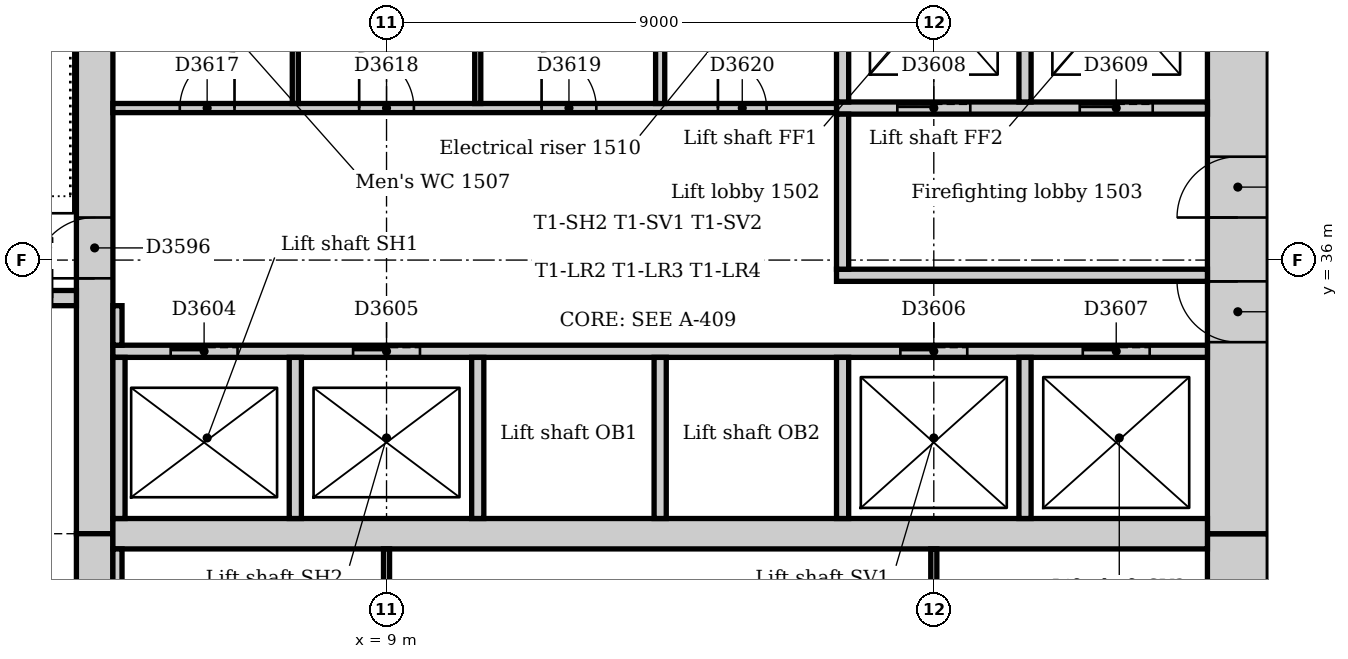
"""IFC4 building model, lengths in metres.
Left out: names, types, materials, properties, quantities, classifications, styles, units other than length and angle.
Written with IfcOpenShell. Run it as: python <this file> out.ifc"""

import sys

from ifc_helpers import new_model, si_unit, direction, frame, frame_2d, origin, place, context, subcontext, project, spatial, rectangle, extrude, element, fill, save


model = new_model("IFC4")
c1 = context("Model", 3, precision=1e-05, world=origin(), true_north=direction((0.0, 1.0)))
c2 = subcontext(c1, "Body", "Model", "MODEL_VIEW")
j1 = project(units=[si_unit("LENGTHUNIT", "METRE"), si_unit("PLANEANGLEUNIT", "RADIAN")], contexts=[c1])
p1 = place(None, origin())
s1 = spatial("IfcSite", under=j1, at=p1, CompositionType="ELEMENT")
p2 = place(p1, origin())
s2 = spatial("IfcBuilding", under=s1, at=p2, CompositionType="ELEMENT")
p3 = place(p2, frame((0.0, 0.0, 67.0)))
s3 = spatial("IfcBuildingStorey", under=s2, at=p3, CompositionType="ELEMENT", Elevation=67.0)
p4 = place(p3, frame((23.0, 21.0, 0.0), z_axis=(0.0, 0.0, 1.0), x_axis=(0.0, 1.0, 0.0)))
e1 = element("IfcWall", 1, at=p4, inside=s3, PredefinedType="SOLIDWALL", context=c2, shape_type="SweptSolid", body=[
    extrude(rectangle(XDim=10.5, YDim=1.0, at=frame_2d((5.25, 0.0))), origin(), (0.0, 0.0, 1.0), 4.0),
])
p5 = place(p4, frame((4.35, 0.0, 0.0)))
e2 = element("IfcOpeningElement", 2, at=p5, cuts=e1, PredefinedType="OPENING", context=c2, shape_type="SweptSolid", body=[
    extrude(rectangle(XDim=1.8, YDim=2.1, at=frame_2d((0.9, 1.05))), frame((0.0, 0.51, 0.0), z_axis=(0.0, -1.0, 0.0), x_axis=(1.0, 0.0, 0.0)), (0.0, 0.0, 1.0), 1.02),
])
p6 = place(p3, frame((23.0, 31.5, 0.0), z_axis=(0.0, 0.0, 1.0), x_axis=(0.0, 1.0, 0.0)))
e3 = element("IfcWall", 3, at=p6, inside=s3, PredefinedType="SOLIDWALL", context=c2, shape_type="SweptSolid", body=[
    extrude(rectangle(XDim=10.5, YDim=1.0, at=frame_2d((5.25, 0.0))), origin(), (0.0, 0.0, 1.0), 4.0),
])
p7 = place(p6, frame((3.15, 0.0, 0.0)))
e4 = element("IfcOpeningElement", 4, at=p7, cuts=e3, PredefinedType="OPENING", context=c2, shape_type="SweptSolid", body=[
    extrude(rectangle(XDim=1.0, YDim=2.1, at=frame_2d((0.5, 1.05))), frame((0.0, 0.51, 0.0), z_axis=(0.0, -1.0, 0.0), x_axis=(1.0, 0.0, 0.0)), (0.0, 0.0, 1.0), 1.02),
])
p8 = place(p6, frame((5.2, 0.0, 0.0)))
e5 = element("IfcOpeningElement", 5, at=p8, cuts=e3, PredefinedType="OPENING", context=c2, shape_type="SweptSolid", body=[
    extrude(rectangle(XDim=1.0, YDim=2.1, at=frame_2d((0.5, 1.05))), frame((0.0, 0.51, 0.0), z_axis=(0.0, -1.0, 0.0), x_axis=(1.0, 0.0, 0.0)), (0.0, 0.0, 1.0), 1.02),
])
p9 = place(p3, frame((4.2, 42.0, 0.0), z_axis=(0.0, 0.0, 1.0), x_axis=(0.0, -1.0, 0.0)))
e6 = element("IfcWall", 6, at=p9, inside=s3, PredefinedType="SOLIDWALL", context=c2, shape_type="SweptSolid", body=[
    extrude(rectangle(XDim=10.5, YDim=0.6, at=frame_2d((5.25, 0.0))), origin(), (0.0, 0.0, 1.0), 4.0),
])
p10 = place(p9, frame((5.3, 0.0, 0.0)))
e7 = element("IfcOpeningElement", 7, at=p10, cuts=e6, PredefinedType="OPENING", context=c2, shape_type="SweptSolid", body=[
    extrude(rectangle(XDim=1.0, YDim=2.1, at=frame_2d((0.5, 1.05))), frame((0.0, 0.31, 0.0), z_axis=(0.0, -1.0, 0.0), x_axis=(1.0, 0.0, 0.0)), (0.0, 0.0, 1.0), 0.62),
])
p11 = place(p3, frame((4.2, 31.5, 0.0), z_axis=(0.0, 0.0, 1.0), x_axis=(0.0, -1.0, 0.0)))
e8 = element("IfcWall", 8, at=p11, inside=s3, PredefinedType="SOLIDWALL", context=c2, shape_type="SweptSolid", body=[
    extrude(rectangle(XDim=10.5, YDim=0.6, at=frame_2d((5.25, 0.0))), origin(), (0.0, 0.0, 1.0), 4.0),
])
p12 = place(p11, frame((4.25, 0.0, 0.0)))
e9 = element("IfcOpeningElement", 9, at=p12, cuts=e8, PredefinedType="OPENING", context=c2, shape_type="SweptSolid", body=[
    extrude(rectangle(XDim=1.0, YDim=2.1, at=frame_2d((0.5, 1.05))), frame((0.0, 0.31, 0.0), z_axis=(0.0, -1.0, 0.0), x_axis=(1.0, 0.0, 0.0)), (0.0, 0.0, 1.0), 0.62),
])
p13 = place(p3, frame((4.5, 31.5, 0.0), z_axis=(0.0, 0.0, 1.0), x_axis=(1.0, 0.0, 0.0)))
e10 = element("IfcWall", 10, at=p13, inside=s3, PredefinedType="SOLIDWALL", context=c2, shape_type="SweptSolid", body=[
    extrude(rectangle(XDim=18.0, YDim=0.5, at=frame_2d((9.0, 0.0))), origin(), (0.0, 0.0, 1.0), 4.0),
])
p14 = place(p3, frame((0.36, 35.375, 0.0), z_axis=(0.0, 0.0, 1.0), x_axis=(1.0, 0.0, 0.0)))
e11 = element("IfcWall", 11, at=p14, inside=s3, PredefinedType="SOLIDWALL", context=c2, shape_type="SweptSolid", body=[
    extrude(rectangle(XDim=3.54, YDim=0.25, at=frame_2d((1.77, 0.0))), origin(), (0.0, 0.0, 1.0), 4.0),
])
p15 = place(p14, frame((2.14, 0.0, 0.0)))
e12 = element("IfcOpeningElement", 12, at=p15, cuts=e11, PredefinedType="OPENING", context=c2, shape_type="SweptSolid", body=[
    extrude(rectangle(XDim=1.0, YDim=2.1, at=frame_2d((0.5, 1.05))), frame((0.0, 0.135, 0.0), z_axis=(0.0, -1.0, 0.0), x_axis=(1.0, 0.0, 0.0)), (0.0, 0.0, 1.0), 0.27),
])
p16 = place(p3, frame((16.4, 35.75, 0.0), z_axis=(0.0, 0.0, 1.0), x_axis=(1.0, 0.0, 0.0)))
e13 = element("IfcWall", 13, at=p16, inside=s3, PredefinedType="PARTITIONING", context=c2, shape_type="SweptSolid", body=[
    extrude(rectangle(XDim=6.1, YDim=0.2, at=frame_2d((3.05, 0.0))), origin(), (0.0, 0.0, 1.0), 3.85),
])
p17 = place(p3, frame((16.4, 38.5, 0.0), z_axis=(0.0, 0.0, 1.0), x_axis=(1.0, 0.0, 0.0)))
e14 = element("IfcWall", 14, at=p17, inside=s3, PredefinedType="PARTITIONING", context=c2, shape_type="SweptSolid", body=[
    extrude(rectangle(XDim=6.1, YDim=0.2, at=frame_2d((3.05, 0.0))), origin(), (0.0, 0.0, 1.0), 3.85),
])
p18 = place(p17, frame((1.0, 0.0, 0.0)))
e15 = element("IfcOpeningElement", 15, at=p18, cuts=e14, PredefinedType="OPENING", context=c2, shape_type="SweptSolid", body=[
    extrude(rectangle(XDim=1.2, YDim=2.1, at=frame_2d((0.6, 1.05))), frame((0.0, 0.11, 0.0), z_axis=(0.0, -1.0, 0.0), x_axis=(1.0, 0.0, 0.0)), (0.0, 0.0, 1.0), 0.22),
])
p19 = place(p17, frame((4.0, 0.0, 0.0)))
e16 = element("IfcOpeningElement", 16, at=p19, cuts=e14, PredefinedType="OPENING", context=c2, shape_type="SweptSolid", body=[
    extrude(rectangle(XDim=1.2, YDim=2.1, at=frame_2d((0.6, 1.05))), frame((0.0, 0.11, 0.0), z_axis=(0.0, -1.0, 0.0), x_axis=(1.0, 0.0, 0.0)), (0.0, 0.0, 1.0), 0.22),
])
p20 = place(p3, frame((16.5, 35.85, 0.0), z_axis=(0.0, 0.0, 1.0), x_axis=(0.0, 1.0, 0.0)))
e17 = element("IfcWall", 17, at=p20, inside=s3, PredefinedType="PARTITIONING", context=c2, shape_type="SweptSolid", body=[
    extrude(rectangle(XDim=2.55, YDim=0.2, at=frame_2d((1.275, 0.0))), origin(), (0.0, 0.0, 1.0), 3.85),
])
p21 = place(p3, frame((4.5, 34.5, 0.0), z_axis=(0.0, 0.0, 1.0), x_axis=(1.0, 0.0, 0.0)))
e18 = element("IfcWall", 18, at=p21, inside=s3, PredefinedType="PARTITIONING", context=c2, shape_type="SweptSolid", body=[
    extrude(rectangle(XDim=18.0, YDim=0.2, at=frame_2d((9.0, 0.0))), origin(), (0.0, 0.0, 1.0), 3.85),
])
p22 = place(p21, frame((0.95, 0.0, 0.0)))
e19 = element("IfcOpeningElement", 19, at=p22, cuts=e18, PredefinedType="OPENING", context=c2, shape_type="SweptSolid", body=[
    extrude(rectangle(XDim=1.1, YDim=2.1, at=frame_2d((0.55, 1.05))), frame((0.0, 0.11, 0.0), z_axis=(0.0, -1.0, 0.0), x_axis=(1.0, 0.0, 0.0)), (0.0, 0.0, 1.0), 0.22),
])
p23 = place(p21, frame((3.95, 0.0, 0.0)))
e20 = element("IfcOpeningElement", 20, at=p23, cuts=e18, PredefinedType="OPENING", context=c2, shape_type="SweptSolid", body=[
    extrude(rectangle(XDim=1.1, YDim=2.1, at=frame_2d((0.55, 1.05))), frame((0.0, 0.11, 0.0), z_axis=(0.0, -1.0, 0.0), x_axis=(1.0, 0.0, 0.0)), (0.0, 0.0, 1.0), 0.22),
])
p24 = place(p21, frame((12.95, 0.0, 0.0)))
e21 = element("IfcOpeningElement", 21, at=p24, cuts=e18, PredefinedType="OPENING", context=c2, shape_type="SweptSolid", body=[
    extrude(rectangle(XDim=1.1, YDim=2.1, at=frame_2d((0.55, 1.05))), frame((0.0, 0.11, 0.0), z_axis=(0.0, -1.0, 0.0), x_axis=(1.0, 0.0, 0.0)), (0.0, 0.0, 1.0), 0.22),
])
p25 = place(p21, frame((15.95, 0.0, 0.0)))
e22 = element("IfcOpeningElement", 22, at=p25, cuts=e18, PredefinedType="OPENING", context=c2, shape_type="SweptSolid", body=[
    extrude(rectangle(XDim=1.1, YDim=2.1, at=frame_2d((0.55, 1.05))), frame((0.0, 0.11, 0.0), z_axis=(0.0, -1.0, 0.0), x_axis=(1.0, 0.0, 0.0)), (0.0, 0.0, 1.0), 0.22),
])
for number, where, z_axis, x_axis in (
    (23, (16.5, 38.6, 0.0), (0.0, 0.0, 1.0), (0.0, 1.0, 0.0)),
    (24, (19.5, 38.6, 0.0), (0.0, 0.0, 1.0), (0.0, 1.0, 0.0)),
):
    element("IfcWall", number, at=place(p3, frame(where, z_axis=z_axis, x_axis=x_axis)), inside=s3, PredefinedType="PARTITIONING", context=c2, shape_type="SweptSolid", body=[
        extrude(rectangle(XDim=3.4, YDim=0.2, at=frame_2d((1.7, 0.0))), origin(), (0.0, 0.0, 1.0), 3.85),
    ])
for number, where, z_axis, x_axis in (
    (25, (4.6, 31.75, 0.0), (0.0, 0.0, 1.0), (0.0, 1.0, 0.0)),
    (26, (7.5, 31.75, 0.0), (0.0, 0.0, 1.0), (0.0, 1.0, 0.0)),
    (27, (10.5, 31.75, 0.0), (0.0, 0.0, 1.0), (0.0, 1.0, 0.0)),
    (28, (13.5, 31.75, 0.0), (0.0, 0.0, 1.0), (0.0, 1.0, 0.0)),
    (29, (16.5, 31.75, 0.0), (0.0, 0.0, 1.0), (0.0, 1.0, 0.0)),
    (30, (19.5, 31.75, 0.0), (0.0, 0.0, 1.0), (0.0, 1.0, 0.0)),
):
    element("IfcWall", number, at=place(p3, frame(where, z_axis=z_axis, x_axis=x_axis)), inside=s3, PredefinedType="PARTITIONING", context=c2, shape_type="SweptSolid", body=[
        extrude(rectangle(XDim=2.65, YDim=0.2, at=frame_2d((1.325, 0.0))), origin(), (0.0, 0.0, 1.0), 3.85),
    ])
p26 = place(p3, frame((4.5, 38.5, 0.0), z_axis=(0.0, 0.0, 1.0), x_axis=(1.0, 0.0, 0.0)))
e31 = element("IfcWall", 31, at=p26, inside=s3, PredefinedType="PARTITIONING", context=c2, shape_type="SweptSolid", body=[
    extrude(rectangle(XDim=11.9, YDim=0.15, at=frame_2d((5.95, 0.0))), origin(), (0.0, 0.0, 1.0), 3.85),
])
p27 = place(p26, frame((1.1, 0.0, 0.0)))
e32 = element("IfcOpeningElement", 32, at=p27, cuts=e31, PredefinedType="OPENING", context=c2, shape_type="SweptSolid", body=[
    extrude(rectangle(XDim=0.9, YDim=2.1, at=frame_2d((0.45, 1.05))), frame((0.0, 0.085, 0.0), z_axis=(0.0, -1.0, 0.0), x_axis=(1.0, 0.0, 0.0)), (0.0, 0.0, 1.0), 0.17),
])
p28 = place(p26, frame((4.05, 0.0, 0.0)))
e33 = element("IfcOpeningElement", 33, at=p28, cuts=e31, PredefinedType="OPENING", context=c2, shape_type="SweptSolid", body=[
    extrude(rectangle(XDim=0.9, YDim=2.1, at=frame_2d((0.45, 1.05))), frame((0.0, 0.085, 0.0), z_axis=(0.0, -1.0, 0.0), x_axis=(1.0, 0.0, 0.0)), (0.0, 0.0, 1.0), 0.17),
])
p29 = place(p26, frame((7.05, 0.0, 0.0)))
e34 = element("IfcOpeningElement", 34, at=p29, cuts=e31, PredefinedType="OPENING", context=c2, shape_type="SweptSolid", body=[
    extrude(rectangle(XDim=0.9, YDim=2.1, at=frame_2d((0.45, 1.05))), frame((0.0, 0.085, 0.0), z_axis=(0.0, -1.0, 0.0), x_axis=(1.0, 0.0, 0.0)), (0.0, 0.0, 1.0), 0.17),
])
p30 = place(p26, frame((9.95, 0.0, 0.0)))
e35 = element("IfcOpeningElement", 35, at=p30, cuts=e31, PredefinedType="OPENING", context=c2, shape_type="SweptSolid", body=[
    extrude(rectangle(XDim=0.8, YDim=2.1, at=frame_2d((0.4, 1.05))), frame((0.0, 0.085, 0.0), z_axis=(0.0, -1.0, 0.0), x_axis=(1.0, 0.0, 0.0)), (0.0, 0.0, 1.0), 0.17),
])
p31 = place(p3, frame((4.575, 28.575, 0.0), z_axis=(0.0, 0.0, 1.0), x_axis=(0.0, 1.0, 0.0)))
e36 = element("IfcWall", 36, at=p31, inside=s3, PredefinedType="PARTITIONING", context=c2, shape_type="SweptSolid", body=[
    extrude(rectangle(XDim=2.675, YDim=0.15, at=frame_2d((1.337, 0.0))), origin(), (0.0, 0.0, 1.0), 3.85),
])
p32 = place(p3, frame((4.575, 34.6, 0.0), z_axis=(0.0, 0.0, 1.0), x_axis=(0.0, 1.0, 0.0)))
e37 = element("IfcWall", 37, at=p32, inside=s3, PredefinedType="PARTITIONING", context=c2, shape_type="SweptSolid", body=[
    extrude(rectangle(XDim=0.65, YDim=0.15, at=frame_2d((0.325, 0.0))), origin(), (0.0, 0.0, 1.0), 3.85),
])
p33 = place(p3, frame((13.5, 38.575, 0.0), z_axis=(0.0, 0.0, 1.0), x_axis=(0.0, 1.0, 0.0)))
e38 = element("IfcWall", 38, at=p33, inside=s3, PredefinedType="PARTITIONING", context=c2, shape_type="SweptSolid", body=[
    extrude(rectangle(XDim=3.425, YDim=0.15, at=frame_2d((1.712, 0.0))), origin(), (0.0, 0.0, 1.0), 3.85),
])
for number, where, z_axis, x_axis in (
    (39, (7.5, 38.575, 0.0), (0.0, 0.0, 1.0), (0.0, 1.0, 0.0)),
    (40, (10.5, 38.575, 0.0), (0.0, 0.0, 1.0), (0.0, 1.0, 0.0)),
):
    element("IfcWall", number, at=place(p3, frame(where, z_axis=z_axis, x_axis=x_axis)), inside=s3, PredefinedType="PARTITIONING", context=c2, shape_type="SweptSolid", body=[
        extrude(rectangle(XDim=3.425, YDim=0.1, at=frame_2d((1.712, 0.0))), origin(), (0.0, 0.0, 1.0), 3.85),
    ])
for number, where, z_axis, x_axis in (
    (41, (9.0, 28.575, 0.0), (0.0, 0.0, 1.0), (0.0, 1.0, 0.0)),
    (42, (18.0, 28.575, 0.0), (0.0, 0.0, 1.0), (0.0, 1.0, 0.0)),
):
    element("IfcWall", number, at=place(p3, frame(where, z_axis=z_axis, x_axis=x_axis)), inside=s3, PredefinedType="PARTITIONING", context=c2, shape_type="SweptSolid", body=[
        extrude(rectangle(XDim=2.675, YDim=0.1, at=frame_2d((1.337, 0.0))), origin(), (0.0, 0.0, 1.0), 3.85),
    ])
p34 = place(p10, frame((1.0, 0.0, 0.0), z_axis=(0.0, 0.0, 1.0), x_axis=(-1.0, 0.0, 0.0)))
e43 = element("IfcDoor", 43, at=p34, inside=s3, OperationType="SINGLE_SWING_LEFT", PredefinedType="DOOR", context=c2, shape_type="SweptSolid", body=[
    extrude(rectangle(XDim=1.0, YDim=2.1, at=frame_2d((0.5, 1.05))), frame((0.0, 0.025, 0.0), z_axis=(0.0, -1.0, 0.0), x_axis=(1.0, 0.0, 0.0)), (0.0, 0.0, 1.0), 0.05),
])
fill(e7, e43)
p35 = place(p22, origin())
e44 = element("IfcDoor", 44, at=p35, inside=s3, OperationType="SLIDING_TO_LEFT", PredefinedType="DOOR", context=c2, shape_type="SweptSolid", body=[
    extrude(rectangle(XDim=1.1, YDim=2.1, at=frame_2d((0.55, 1.05))), frame((0.0, 0.025, 0.0), z_axis=(0.0, -1.0, 0.0), x_axis=(1.0, 0.0, 0.0)), (0.0, 0.0, 1.0), 0.05),
])
fill(e19, e44)
p36 = place(p23, origin())
e45 = element("IfcDoor", 45, at=p36, inside=s3, OperationType="SLIDING_TO_LEFT", PredefinedType="DOOR", context=c2, shape_type="SweptSolid", body=[
    extrude(rectangle(XDim=1.1, YDim=2.1, at=frame_2d((0.55, 1.05))), frame((0.0, 0.025, 0.0), z_axis=(0.0, -1.0, 0.0), x_axis=(1.0, 0.0, 0.0)), (0.0, 0.0, 1.0), 0.05),
])
fill(e20, e45)
p37 = place(p24, origin())
e46 = element("IfcDoor", 46, at=p37, inside=s3, OperationType="SLIDING_TO_LEFT", PredefinedType="DOOR", context=c2, shape_type="SweptSolid", body=[
    extrude(rectangle(XDim=1.1, YDim=2.1, at=frame_2d((0.55, 1.05))), frame((0.0, 0.025, 0.0), z_axis=(0.0, -1.0, 0.0), x_axis=(1.0, 0.0, 0.0)), (0.0, 0.0, 1.0), 0.05),
])
fill(e21, e46)
p38 = place(p25, origin())
e47 = element("IfcDoor", 47, at=p38, inside=s3, OperationType="SLIDING_TO_LEFT", PredefinedType="DOOR", context=c2, shape_type="SweptSolid", body=[
    extrude(rectangle(XDim=1.1, YDim=2.1, at=frame_2d((0.55, 1.05))), frame((0.0, 0.025, 0.0), z_axis=(0.0, -1.0, 0.0), x_axis=(1.0, 0.0, 0.0)), (0.0, 0.0, 1.0), 0.05),
])
fill(e22, e47)
p39 = place(p18, origin())
e48 = element("IfcDoor", 48, at=p39, inside=s3, OperationType="SLIDING_TO_LEFT", PredefinedType="DOOR", context=c2, shape_type="SweptSolid", body=[
    extrude(rectangle(XDim=1.2, YDim=2.1, at=frame_2d((0.6, 1.05))), frame((0.0, 0.025, 0.0), z_axis=(0.0, -1.0, 0.0), x_axis=(1.0, 0.0, 0.0)), (0.0, 0.0, 1.0), 0.05),
])
fill(e15, e48)
p40 = place(p19, origin())
e49 = element("IfcDoor", 49, at=p40, inside=s3, OperationType="SLIDING_TO_LEFT", PredefinedType="DOOR", context=c2, shape_type="SweptSolid", body=[
    extrude(rectangle(XDim=1.2, YDim=2.1, at=frame_2d((0.6, 1.05))), frame((0.0, 0.025, 0.0), z_axis=(0.0, -1.0, 0.0), x_axis=(1.0, 0.0, 0.0)), (0.0, 0.0, 1.0), 0.05),
])
fill(e16, e49)
p41 = place(p7, origin())
e50 = element("IfcDoor", 50, at=p41, inside=s3, OperationType="SINGLE_SWING_RIGHT", PredefinedType="DOOR", context=c2, shape_type="SweptSolid", body=[
    extrude(rectangle(XDim=1.0, YDim=2.1, at=frame_2d((0.5, 1.05))), frame((0.0, 0.025, 0.0), z_axis=(0.0, -1.0, 0.0), x_axis=(1.0, 0.0, 0.0)), (0.0, 0.0, 1.0), 0.05),
])
fill(e4, e50)
p42 = place(p8, origin())
e51 = element("IfcDoor", 51, at=p42, inside=s3, OperationType="SINGLE_SWING_LEFT", PredefinedType="DOOR", context=c2, shape_type="SweptSolid", body=[
    extrude(rectangle(XDim=1.0, YDim=2.1, at=frame_2d((0.5, 1.05))), frame((0.0, 0.025, 0.0), z_axis=(0.0, -1.0, 0.0), x_axis=(1.0, 0.0, 0.0)), (0.0, 0.0, 1.0), 0.05),
])
fill(e5, e51)
p43 = place(p27, origin())
e52 = element("IfcDoor", 52, at=p43, inside=s3, OperationType="SINGLE_SWING_RIGHT", PredefinedType="DOOR", context=c2, shape_type="SweptSolid", body=[
    extrude(rectangle(XDim=0.9, YDim=2.1, at=frame_2d((0.45, 1.05))), frame((0.0, 0.025, 0.0), z_axis=(0.0, -1.0, 0.0), x_axis=(1.0, 0.0, 0.0)), (0.0, 0.0, 1.0), 0.05),
])
fill(e32, e52)
p44 = place(p28, origin())
e53 = element("IfcDoor", 53, at=p44, inside=s3, OperationType="SINGLE_SWING_LEFT", PredefinedType="DOOR", context=c2, shape_type="SweptSolid", body=[
    extrude(rectangle(XDim=0.9, YDim=2.1, at=frame_2d((0.45, 1.05))), frame((0.0, 0.025, 0.0), z_axis=(0.0, -1.0, 0.0), x_axis=(1.0, 0.0, 0.0)), (0.0, 0.0, 1.0), 0.05),
])
fill(e33, e53)
p45 = place(p29, origin())
e54 = element("IfcDoor", 54, at=p45, inside=s3, OperationType="SINGLE_SWING_LEFT", PredefinedType="DOOR", context=c2, shape_type="SweptSolid", body=[
    extrude(rectangle(XDim=0.9, YDim=2.1, at=frame_2d((0.45, 1.05))), frame((0.0, 0.025, 0.0), z_axis=(0.0, -1.0, 0.0), x_axis=(1.0, 0.0, 0.0)), (0.0, 0.0, 1.0), 0.05),
])
fill(e34, e54)
p46 = place(p30, origin())
e55 = element("IfcDoor", 55, at=p46, inside=s3, OperationType="SINGLE_SWING_LEFT", PredefinedType="DOOR", context=c2, shape_type="SweptSolid", body=[
    extrude(rectangle(XDim=0.8, YDim=2.1, at=frame_2d((0.4, 1.05))), frame((0.0, 0.025, 0.0), z_axis=(0.0, -1.0, 0.0), x_axis=(1.0, 0.0, 0.0)), (0.0, 0.0, 1.0), 0.05),
])
fill(e35, e55)
save(model, sys.argv[1])
